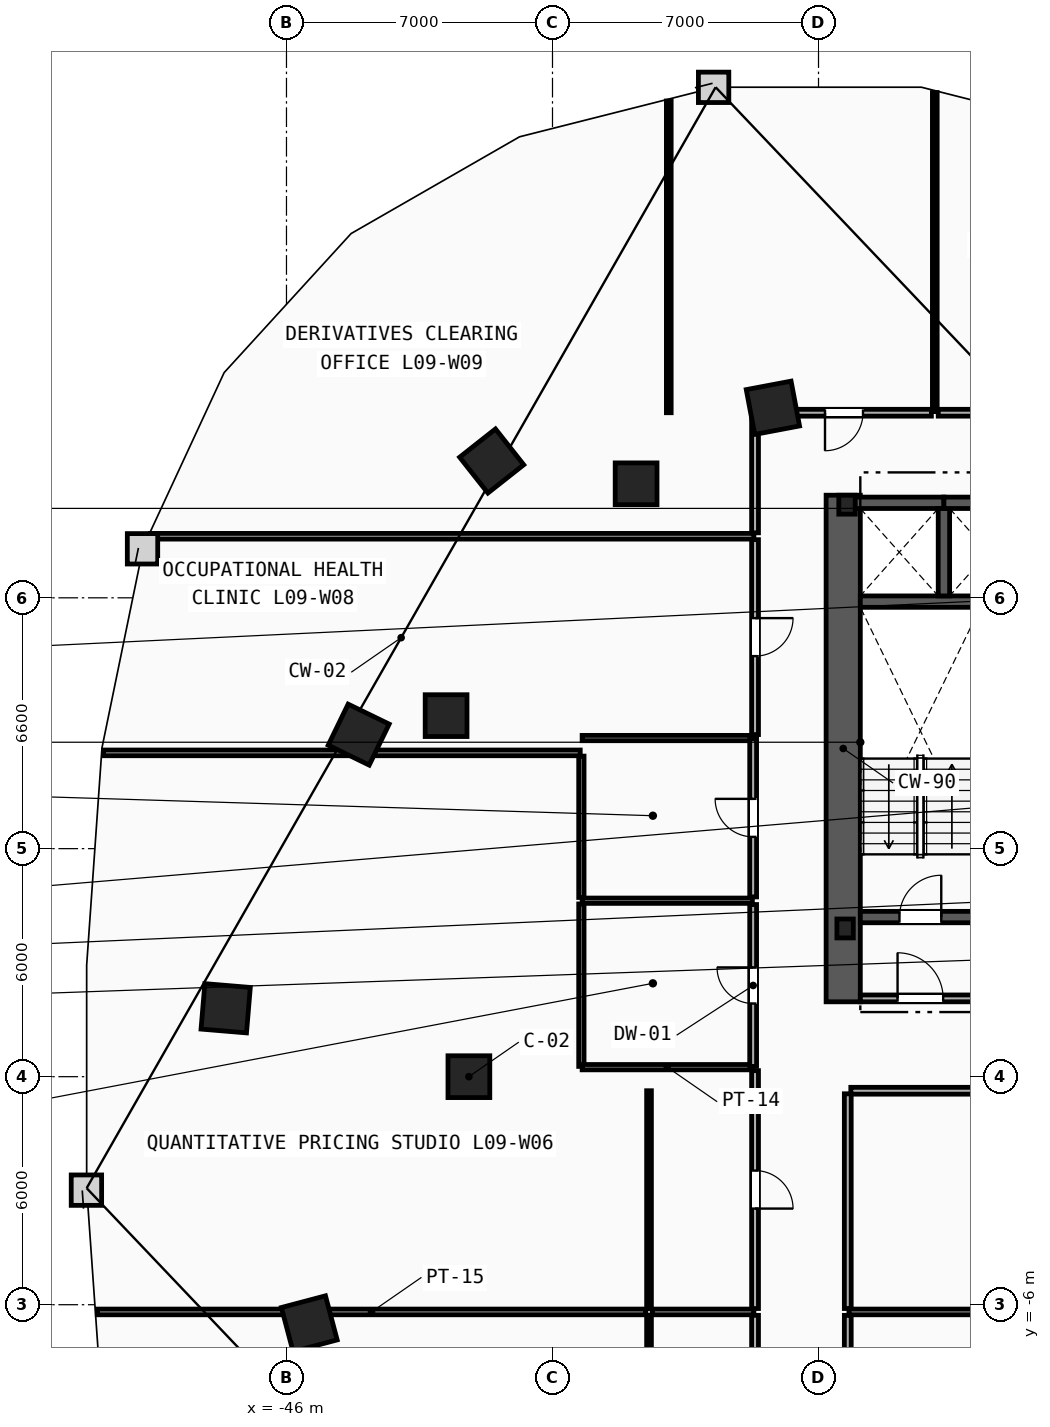
"""IFC4 building model, lengths in metres.
Left out: names, types, materials, properties, quantities, classifications, styles, units other than length and angle.
Written with IfcOpenShell. Run it as: python <this file> out.ifc"""

import sys

from ifc_helpers import new_model, si_unit, direction, frame, frame_2d, origin, origin_2d, place, context, subcontext, project, spatial, rectangle, i_section, extrude, element, fill, save


model = new_model("IFC4")
c1 = context("Model", 3, precision=1e-05, world=origin(), true_north=direction((0.0, 1.0)))
c2 = subcontext(c1, "Body", "Model", "MODEL_VIEW")
j1 = project(units=[si_unit("LENGTHUNIT", "METRE"), si_unit("PLANEANGLEUNIT", "RADIAN")], contexts=[c1])
p1 = place(None, origin())
s1 = spatial("IfcSite", under=j1, at=p1, CompositionType="ELEMENT")
p2 = place(p1, origin())
s2 = spatial("IfcBuilding", under=s1, at=p2, CompositionType="ELEMENT")
p3 = place(p2, frame((0.0, 0.0, 39.2)))
s3 = spatial("IfcBuildingStorey", under=s2, at=p3, CompositionType="ELEMENT", Elevation=39.2)
for number, where, z_axis, x_axis in (
    (1, (-31.3, 3.9, 0.0), (0.0, 0.0, 1.0), (1.0, 0.0, 0.0)),
    (2, (-31.25, 15.05, 0.0), (0.0, 0.0, 1.0), (1.0, 0.0, 0.0)),
):
    element("IfcColumn", number, at=place(p3, frame(where, z_axis=z_axis, x_axis=x_axis)), inside=s3, PredefinedType="COLUMN", context=c2, shape_type="SweptSolid", body=[
        extrude(i_section(OverallWidth=0.432, OverallDepth=0.498, WebThickness=0.056, FlangeThickness=0.089, FilletRadius=0.018, at=origin_2d()), origin(), (0.0, 0.0, 1.0), 3.8),
    ])
for number, where, z_axis, x_axis in (
    (3, (-41.2, 0.0, 0.0), (0.0, 0.0, 1.0), (1.0, 0.0, 0.0)),
    (4, (-41.8, 9.5, 0.0), (0.0, 0.0, 1.0), (1.0, 0.0, 0.0)),
    (5, (-36.8, 15.6, 0.0), (0.0, 0.0, 1.0), (1.0, 0.0, 0.0)),
):
    element("IfcColumn", number, at=place(p3, frame(where, z_axis=z_axis, x_axis=x_axis)), inside=s3, PredefinedType="COLUMN", context=c2, shape_type="SweptSolid", body=[
        extrude(rectangle(XDim=1.1, YDim=1.1, at=origin_2d()), origin(), (0.0, 0.0, 1.0), 3.8),
    ])
for number, where, z_axis, x_axis in (
    (6, (-33.2, 17.6, 0.0), (0.0, 0.0, 1.0), (-0.983, -0.186, 0.0)),
    (7, (-40.6, 16.2, 0.0), (0.0, 0.0, 1.0), (-0.785, -0.619, 0.0)),
    (8, (-44.1, 9.0, 0.0), (0.0, 0.0, 1.0), (-0.437, -0.899, 0.0)),
    (9, (-47.6, 1.8, 0.0), (0.0, 0.0, 1.0), (-0.084, -0.997, 0.0)),
    (10, (-45.4, -6.5, 0.0), (0.0, 0.0, 1.0), (0.256, -0.967, 0.0)),
):
    element("IfcColumn", number, at=place(p3, frame(where, z_axis=z_axis, x_axis=x_axis)), inside=s3, PredefinedType="COLUMN", context=c2, shape_type="SweptSolid", body=[
        extrude(rectangle(XDim=1.2, YDim=1.2, at=origin_2d()), origin(), (0.0, 0.0, 1.0), 3.8),
    ])
p4 = place(p3, frame((-31.35, 1.97, 0.0), z_axis=(0.0, 0.0, 1.0), x_axis=(0.0, 1.0, 0.0)))
e11 = element("IfcWall", 11, at=p4, inside=s3, PredefinedType="SHEAR", context=c2, shape_type="SweptSolid", body=[
    extrude(rectangle(XDim=13.33, YDim=0.9, at=frame_2d((6.665, 0.0))), origin(), (0.0, 0.0, 1.0), 3.5),
])
p5 = place(p3, frame((-30.9, 4.2, 0.0), z_axis=(0.0, 0.0, 1.0), x_axis=(1.0, 0.0, 0.0)))
e12 = element("IfcWall", 12, at=p5, inside=s3, PredefinedType="SHEAR", context=c2, shape_type="SweptSolid", body=[
    extrude(rectangle(XDim=3.16, YDim=0.3, at=frame_2d((1.58, 0.0))), origin(), (0.0, 0.0, 1.0), 3.5),
])
p6 = place(p5, frame((1.03, 0.0, 0.0)))
e13 = element("IfcOpeningElement", 13, at=p6, cuts=e12, PredefinedType="OPENING", context=c2, shape_type="SweptSolid", body=[
    extrude(rectangle(XDim=1.1, YDim=2.15, at=frame_2d((0.55, 1.075))), frame((0.0, 0.16, 0.0), z_axis=(0.0, -1.0, 0.0), x_axis=(1.0, 0.0, 0.0)), (0.0, 0.0, 1.0), 0.32),
])
p7 = place(p3, frame((-30.9, 12.5, 0.0), z_axis=(0.0, 0.0, 1.0), x_axis=(1.0, 0.0, 0.0)))
e14 = element("IfcWall", 14, at=p7, inside=s3, PredefinedType="SHEAR", context=c2, shape_type="SweptSolid", body=[
    extrude(rectangle(XDim=3.16, YDim=0.3, at=frame_2d((1.58, 0.0))), origin(), (0.0, 0.0, 1.0), 3.5),
])
p8 = place(p3, frame((-30.9, 2.06, 0.0), z_axis=(0.0, 0.0, 1.0), x_axis=(1.0, 0.0, 0.0)))
e15 = element("IfcWall", 15, at=p8, inside=s3, PredefinedType="PARTITIONING", context=c2, shape_type="SweptSolid", body=[
    extrude(rectangle(XDim=3.16, YDim=0.18, at=frame_2d((1.58, 0.0))), origin(), (0.0, 0.0, 1.0), 3.5),
])
p9 = place(p8, frame((0.98, 0.0, 0.0)))
e16 = element("IfcOpeningElement", 16, at=p9, cuts=e15, PredefinedType="OPENING", context=c2, shape_type="SweptSolid", body=[
    extrude(rectangle(XDim=1.2, YDim=2.15, at=frame_2d((0.6, 1.075))), frame((0.0, 0.1, 0.0), z_axis=(0.0, -1.0, 0.0), x_axis=(1.0, 0.0, 0.0)), (0.0, 0.0, 1.0), 0.2),
])
p10 = place(p3, frame((-31.2, 15.1, 0.0), z_axis=(0.0, 0.0, 1.0), x_axis=(1.0, 0.0, 0.0)))
e17 = element("IfcWall", 17, at=p10, inside=s3, PredefinedType="SHEAR", context=c2, shape_type="SweptSolid", body=[
    extrude(rectangle(XDim=2.5, YDim=0.3, at=frame_2d((1.25, 0.0))), origin(), (0.0, 0.0, 1.0), 3.5),
])
p11 = place(p3, frame((-28.7, 12.65, 0.0), z_axis=(0.0, 0.0, 1.0), x_axis=(0.0, 1.0, 0.0)))
e18 = element("IfcWall", 18, at=p11, inside=s3, PredefinedType="SHEAR", context=c2, shape_type="SweptSolid", body=[
    extrude(rectangle(XDim=2.3, YDim=0.3, at=frame_2d((1.15, 0.0))), origin(), (0.0, 0.0, 1.0), 3.5),
])
p12 = place(p3, frame((-28.7, 15.1, 0.0), z_axis=(0.0, 0.0, 1.0), x_axis=(1.0, 0.0, 0.0)))
e19 = element("IfcWall", 19, at=p12, inside=s3, PredefinedType="SHEAR", context=c2, shape_type="SweptSolid", body=[
    extrude(rectangle(XDim=2.5, YDim=0.3, at=frame_2d((1.25, 0.0))), origin(), (0.0, 0.0, 1.0), 3.5),
])
p13 = place(p3, frame((-38.24, 0.27, 0.0), z_axis=(0.0, 0.0, 1.0), x_axis=(0.0, 1.0, 0.0)))
e20 = element("IfcWall", 20, at=p13, inside=s3, PredefinedType="PARTITIONING", context=c2, shape_type="SweptSolid", body=[
    extrude(rectangle(XDim=4.275, YDim=0.14, at=frame_2d((2.137, 0.0))), origin(), (0.0, 0.0, 1.0), 3.5),
])
p14 = place(p3, frame((-38.24, 4.715, 0.0), z_axis=(0.0, 0.0, 1.0), x_axis=(0.0, 1.0, 0.0)))
e21 = element("IfcWall", 21, at=p14, inside=s3, PredefinedType="PARTITIONING", context=c2, shape_type="SweptSolid", body=[
    extrude(rectangle(XDim=3.72, YDim=0.14, at=frame_2d((1.86, 0.0))), origin(), (0.0, 0.0, 1.0), 3.5),
])
for number, where, z_axis, x_axis in (
    (22, (-38.22, 0.25, 0.0), (0.0, 0.0, 1.0), (1.0, 0.0, 0.0)),
    (23, (-38.22, 4.63, 0.0), (0.0, 0.0, 1.0), (1.0, 0.0, 0.0)),
    (24, (-38.22, 8.91, 0.0), (0.0, 0.0, 1.0), (1.0, 0.0, 0.0)),
):
    element("IfcWall", number, at=place(p3, frame(where, z_axis=z_axis, x_axis=x_axis)), inside=s3, PredefinedType="PARTITIONING", context=c2, shape_type="SweptSolid", body=[
        extrude(rectangle(XDim=4.48, YDim=0.14, at=frame_2d((2.24, 0.0))), origin(), (0.0, 0.0, 1.0), 3.5),
    ])
p15 = place(p3, frame((-33.72, 0.27, 0.0), z_axis=(0.0, 0.0, 1.0), x_axis=(0.0, 1.0, 0.0)))
e25 = element("IfcWall", 25, at=p15, inside=s3, PredefinedType="PARTITIONING", context=c2, shape_type="SweptSolid", body=[
    extrude(rectangle(XDim=4.26, YDim=0.18, at=frame_2d((2.13, 0.0))), origin(), (0.0, 0.0, 1.0), 3.5),
])
p16 = place(p15, frame((1.655, 0.0, 0.0)))
e26 = element("IfcOpeningElement", 26, at=p16, cuts=e25, PredefinedType="OPENING", context=c2, shape_type="SweptSolid", body=[
    extrude(rectangle(XDim=0.95, YDim=2.1, at=frame_2d((0.475, 1.05))), frame((0.0, 0.1, 0.0), z_axis=(0.0, -1.0, 0.0), x_axis=(1.0, 0.0, 0.0)), (0.0, 0.0, 1.0), 0.2),
])
p17 = place(p3, frame((-33.72, 4.73, 0.0), z_axis=(0.0, 0.0, 1.0), x_axis=(0.0, 1.0, 0.0)))
e27 = element("IfcWall", 27, at=p17, inside=s3, PredefinedType="PARTITIONING", context=c2, shape_type="SweptSolid", body=[
    extrude(rectangle(XDim=4.16, YDim=0.18, at=frame_2d((2.08, 0.0))), origin(), (0.0, 0.0, 1.0), 3.5),
])
p18 = place(p17, frame((1.58, 0.0, 0.0)))
e28 = element("IfcOpeningElement", 28, at=p18, cuts=e27, PredefinedType="OPENING", context=c2, shape_type="SweptSolid", body=[
    extrude(rectangle(XDim=1.0, YDim=2.15, at=frame_2d((0.5, 1.075))), frame((0.0, 0.1, 0.0), z_axis=(0.0, -1.0, 0.0), x_axis=(1.0, 0.0, 0.0)), (0.0, 0.0, 1.0), 0.2),
])
p19 = place(p3, frame((-36.46, -11.45, 0.0), z_axis=(0.0, 0.0, 1.0), x_axis=(0.0, 1.0, 0.0)))
e29 = element("IfcWall", 29, at=p19, inside=s3, PredefinedType="PARTITIONING", context=c2, shape_type="SweptSolid", body=[
    extrude(rectangle(XDim=5.175, YDim=0.125, at=frame_2d((2.587, 0.0))), origin(), (0.0, 0.0, 1.0), 3.5),
])
p20 = place(p3, frame((-36.46, -6.105, 0.0), z_axis=(0.0, 0.0, 1.0), x_axis=(0.0, 1.0, 0.0)))
e30 = element("IfcWall", 30, at=p20, inside=s3, PredefinedType="PARTITIONING", context=c2, shape_type="SweptSolid", body=[
    extrude(rectangle(XDim=5.735, YDim=0.125, at=frame_2d((2.867, 0.0))), origin(), (0.0, 0.0, 1.0), 3.5),
])
p21 = place(p3, frame((-50.979, -6.19, 0.0), z_axis=(0.0, 0.0, 1.0), x_axis=(1.0, 0.0, 0.0)))
e31 = element("IfcWall", 31, at=p21, inside=s3, PredefinedType="PARTITIONING", context=c2, shape_type="SweptSolid", body=[
    extrude(rectangle(XDim=14.434, YDim=0.15, at=frame_2d((7.217, 0.0))), origin(), (0.0, 0.0, 1.0), 3.5),
])
p22 = place(p3, frame((-36.375, -6.19, 0.0), z_axis=(0.0, 0.0, 1.0), x_axis=(1.0, 0.0, 0.0)))
e32 = element("IfcWall", 32, at=p22, inside=s3, PredefinedType="PARTITIONING", context=c2, shape_type="SweptSolid", body=[
    extrude(rectangle(XDim=2.675, YDim=0.15, at=frame_2d((1.337, 0.0))), origin(), (0.0, 0.0, 1.0), 3.5),
])
p23 = place(p3, frame((-31.2, -6.19, 0.0), z_axis=(0.0, 0.0, 1.0), x_axis=(1.0, 0.0, 0.0)))
e33 = element("IfcWall", 33, at=p23, inside=s3, PredefinedType="PARTITIONING", context=c2, shape_type="SweptSolid", body=[
    extrude(rectangle(XDim=18.178, YDim=0.15, at=frame_2d((9.089, 0.0))), origin(), (0.0, 0.0, 1.0), 3.5),
])
p24 = place(p3, frame((-50.814, 8.52, 0.0), z_axis=(0.0, 0.0, 1.0), x_axis=(1.0, 0.0, 0.0)))
e34 = element("IfcWall", 34, at=p24, inside=s3, PredefinedType="PARTITIONING", context=c2, shape_type="SweptSolid", body=[
    extrude(rectangle(XDim=12.544, YDim=0.15, at=frame_2d((6.272, 0.0))), origin(), (0.0, 0.0, 1.0), 3.5),
])
p25 = place(p3, frame((-49.585, 14.22, 0.0), z_axis=(0.0, 0.0, 1.0), x_axis=(1.0, 0.0, 0.0)))
e35 = element("IfcWall", 35, at=p25, inside=s3, PredefinedType="PARTITIONING", context=c2, shape_type="SweptSolid", body=[
    extrude(rectangle(XDim=15.885, YDim=0.15, at=frame_2d((7.942, 0.0))), origin(), (0.0, 0.0, 1.0), 3.5),
])
p26 = place(p3, frame((-35.94, 17.47, 0.0), z_axis=(0.0, 0.0, 1.0), x_axis=(0.0, 1.0, 0.0)))
e36 = element("IfcWall", 36, at=p26, inside=s3, PredefinedType="PARTITIONING", context=c2, shape_type="SweptSolid", body=[
    extrude(rectangle(XDim=8.202, YDim=0.125, at=frame_2d((4.101, 0.0))), origin(), (0.0, 0.0, 1.0), 3.5),
])
p27 = place(p3, frame((-28.94, 17.5, 0.0), z_axis=(0.0, 0.0, 1.0), x_axis=(0.0, 1.0, 0.0)))
e37 = element("IfcWall", 37, at=p27, inside=s3, PredefinedType="PARTITIONING", context=c2, shape_type="SweptSolid", body=[
    extrude(rectangle(XDim=8.395, YDim=0.125, at=frame_2d((4.197, 0.0))), origin(), (0.0, 0.0, 1.0), 3.5),
])
p28 = place(p3, frame((-31.23, -11.4, 0.0), z_axis=(0.0, 0.0, 1.0), x_axis=(0.0, 1.0, 0.0)))
e38 = element("IfcWall", 38, at=p28, inside=s3, PredefinedType="PARTITIONING", context=c2, shape_type="SweptSolid", body=[
    extrude(rectangle(XDim=5.12, YDim=0.18, at=frame_2d((2.56, 0.0))), origin(), (0.0, 0.0, 1.0), 3.5),
])
p29 = place(p3, frame((-33.67, -6.28, 0.0), z_axis=(0.0, 0.0, 1.0), x_axis=(0.0, -1.0, 0.0)))
e39 = element("IfcWall", 39, at=p29, inside=s3, PredefinedType="PARTITIONING", context=c2, shape_type="SweptSolid", body=[
    extrude(rectangle(XDim=5.12, YDim=0.18, at=frame_2d((2.56, 0.0))), origin(), (0.0, 0.0, 1.0), 3.5),
])
p30 = place(p29, frame((2.06, 0.0, 0.0)))
e40 = element("IfcOpeningElement", 40, at=p30, cuts=e39, PredefinedType="OPENING", context=c2, shape_type="SweptSolid", body=[
    extrude(rectangle(XDim=1.0, YDim=2.15, at=frame_2d((0.5, 1.075))), frame((0.0, 0.1, 0.0), z_axis=(0.0, -1.0, 0.0), x_axis=(1.0, 0.0, 0.0)), (0.0, 0.0, 1.0), 0.2),
])
p31 = place(p3, frame((-33.67, 0.159, 0.0), z_axis=(0.0, 0.0, 1.0), x_axis=(0.0, -1.0, 0.0)))
e41 = element("IfcWall", 41, at=p31, inside=s3, PredefinedType="PARTITIONING", context=c2, shape_type="SweptSolid", body=[
    extrude(rectangle(XDim=6.259, YDim=0.18, at=frame_2d((3.129, 0.0))), origin(), (0.0, 0.0, 1.0), 3.5),
])
p32 = place(p31, frame((2.629, 0.0, 0.0)))
e42 = element("IfcOpeningElement", 42, at=p32, cuts=e41, PredefinedType="OPENING", context=c2, shape_type="SweptSolid", body=[
    extrude(rectangle(XDim=1.0, YDim=2.15, at=frame_2d((0.5, 1.075))), frame((0.0, 0.1, 0.0), z_axis=(0.0, -1.0, 0.0), x_axis=(1.0, 0.0, 0.0)), (0.0, 0.0, 1.0), 0.2),
])
p33 = place(p3, frame((-31.15, -0.37, 0.0), z_axis=(0.0, 0.0, 1.0), x_axis=(1.0, 0.0, 0.0)))
e43 = element("IfcWall", 43, at=p33, inside=s3, PredefinedType="PARTITIONING", context=c2, shape_type="SweptSolid", body=[
    extrude(rectangle(XDim=14.328, YDim=0.18, at=frame_2d((7.164, 0.0))), origin(), (0.0, 0.0, 1.0), 3.5),
])
p34 = place(p33, frame((6.664, 0.0, 0.0)))
e44 = element("IfcOpeningElement", 44, at=p34, cuts=e43, PredefinedType="OPENING", context=c2, shape_type="SweptSolid", body=[
    extrude(rectangle(XDim=1.0, YDim=2.15, at=frame_2d((0.5, 1.075))), frame((0.0, 0.1, 0.0), z_axis=(0.0, -1.0, 0.0), x_axis=(1.0, 0.0, 0.0)), (0.0, 0.0, 1.0), 0.2),
])
p35 = place(p3, frame((-31.23, -6.1, 0.0), z_axis=(0.0, 0.0, 1.0), x_axis=(0.0, 1.0, 0.0)))
e45 = element("IfcWall", 45, at=p35, inside=s3, PredefinedType="PARTITIONING", context=c2, shape_type="SweptSolid", body=[
    extrude(rectangle(XDim=5.65, YDim=0.18, at=frame_2d((2.825, 0.0))), origin(), (0.0, 0.0, 1.0), 3.5),
])
p36 = place(p3, frame((-33.67, 14.13, 0.0), z_axis=(0.0, 0.0, 1.0), x_axis=(0.0, -1.0, 0.0)))
e46 = element("IfcWall", 46, at=p36, inside=s3, PredefinedType="PARTITIONING", context=c2, shape_type="SweptSolid", body=[
    extrude(rectangle(XDim=5.128, YDim=0.18, at=frame_2d((2.564, 0.0))), origin(), (0.0, 0.0, 1.0), 3.5),
])
p37 = place(p36, frame((2.064, 0.0, 0.0)))
e47 = element("IfcOpeningElement", 47, at=p37, cuts=e46, PredefinedType="OPENING", context=c2, shape_type="SweptSolid", body=[
    extrude(rectangle(XDim=1.0, YDim=2.15, at=frame_2d((0.5, 1.075))), frame((0.0, 0.1, 0.0), z_axis=(0.0, -1.0, 0.0), x_axis=(1.0, 0.0, 0.0)), (0.0, 0.0, 1.0), 0.2),
])
p38 = place(p3, frame((-29.03, 17.47, 0.0), z_axis=(0.0, 0.0, 1.0), x_axis=(-1.0, 0.0, 0.0)))
e48 = element("IfcWall", 48, at=p38, inside=s3, PredefinedType="PARTITIONING", context=c2, shape_type="SweptSolid", body=[
    extrude(rectangle(XDim=4.598, YDim=0.18, at=frame_2d((2.299, 0.0))), origin(), (0.0, 0.0, 1.0), 3.5),
])
p39 = place(p38, frame((1.799, 0.0, 0.0)))
e49 = element("IfcOpeningElement", 49, at=p39, cuts=e48, PredefinedType="OPENING", context=c2, shape_type="SweptSolid", body=[
    extrude(rectangle(XDim=1.0, YDim=2.15, at=frame_2d((0.5, 1.075))), frame((0.0, 0.1, 0.0), z_axis=(0.0, -1.0, 0.0), x_axis=(1.0, 0.0, 0.0)), (0.0, 0.0, 1.0), 0.2),
])
p40 = place(p3, frame((-33.67, 17.428, 0.0), z_axis=(0.0, 0.0, 1.0), x_axis=(0.0, -1.0, 0.0)))
e50 = element("IfcWall", 50, at=p40, inside=s3, PredefinedType="PARTITIONING", context=c2, shape_type="SweptSolid", body=[
    extrude(rectangle(XDim=3.118, YDim=0.18, at=frame_2d((1.559, 0.0))), origin(), (0.0, 0.0, 1.0), 3.5),
])
p41 = place(p3, frame((-23.03, 17.47, 0.0), z_axis=(0.0, 0.0, 1.0), x_axis=(-1.0, 0.0, 0.0)))
e51 = element("IfcWall", 51, at=p41, inside=s3, PredefinedType="PARTITIONING", context=c2, shape_type="SweptSolid", body=[
    extrude(rectangle(XDim=5.82, YDim=0.18, at=frame_2d((2.91, 0.0))), origin(), (0.0, 0.0, 1.0), 3.5),
])
p42 = place(p41, frame((1.036, 0.0, 0.0)))
e52 = element("IfcOpeningElement", 52, at=p42, cuts=e51, PredefinedType="OPENING", context=c2, shape_type="SweptSolid", body=[
    extrude(rectangle(XDim=1.0, YDim=2.15, at=frame_2d((0.5, 1.075))), frame((0.0, 0.1, 0.0), z_axis=(0.0, -1.0, 0.0), x_axis=(1.0, 0.0, 0.0)), (0.0, 0.0, 1.0), 0.2),
])
p43 = place(p6, origin())
e53 = element("IfcDoor", 53, at=p43, inside=s3, OperationType="SINGLE_SWING_RIGHT", PredefinedType="DOOR", context=c2, shape_type="SweptSolid", body=[
    extrude(rectangle(XDim=1.1, YDim=2.15, at=frame_2d((0.55, 1.075))), frame((0.0, 0.025, 0.0), z_axis=(0.0, -1.0, 0.0), x_axis=(1.0, 0.0, 0.0)), (0.0, 0.0, 1.0), 0.05),
])
fill(e13, e53)
p44 = place(p9, origin())
e54 = element("IfcDoor", 54, at=p44, inside=s3, OperationType="SINGLE_SWING_LEFT", PredefinedType="DOOR", context=c2, shape_type="SweptSolid", body=[
    extrude(rectangle(XDim=1.2, YDim=2.15, at=frame_2d((0.6, 1.075))), frame((0.0, 0.025, 0.0), z_axis=(0.0, -1.0, 0.0), x_axis=(1.0, 0.0, 0.0)), (0.0, 0.0, 1.0), 0.05),
])
fill(e16, e54)
p45 = place(p32, origin())
e55 = element("IfcDoor", 55, at=p45, inside=s3, OperationType="SINGLE_SWING_RIGHT", PredefinedType="DOOR", context=c2, shape_type="SweptSolid", body=[
    extrude(rectangle(XDim=1.0, YDim=2.15, at=frame_2d((0.5, 1.075))), frame((0.0, 0.025, 0.0), z_axis=(0.0, -1.0, 0.0), x_axis=(1.0, 0.0, 0.0)), (0.0, 0.0, 1.0), 0.05),
])
fill(e42, e55)
p46 = place(p37, origin())
e56 = element("IfcDoor", 56, at=p46, inside=s3, OperationType="SINGLE_SWING_LEFT", PredefinedType="DOOR", context=c2, shape_type="SweptSolid", body=[
    extrude(rectangle(XDim=1.0, YDim=2.15, at=frame_2d((0.5, 1.075))), frame((0.0, 0.025, 0.0), z_axis=(0.0, -1.0, 0.0), x_axis=(1.0, 0.0, 0.0)), (0.0, 0.0, 1.0), 0.05),
])
fill(e47, e56)
p47 = place(p39, origin())
e57 = element("IfcDoor", 57, at=p47, inside=s3, OperationType="SINGLE_SWING_RIGHT", PredefinedType="DOOR", context=c2, shape_type="SweptSolid", body=[
    extrude(rectangle(XDim=1.0, YDim=2.15, at=frame_2d((0.5, 1.075))), frame((0.0, 0.025, 0.0), z_axis=(0.0, -1.0, 0.0), x_axis=(1.0, 0.0, 0.0)), (0.0, 0.0, 1.0), 0.05),
])
fill(e49, e57)
p48 = place(p16, origin())
e58 = element("IfcDoor", 58, at=p48, inside=s3, OperationType="SINGLE_SWING_RIGHT", PredefinedType="DOOR", context=c2, shape_type="SweptSolid", body=[
    extrude(rectangle(XDim=0.95, YDim=2.1, at=frame_2d((0.475, 1.05))), frame((0.0, 0.025, 0.0), z_axis=(0.0, -1.0, 0.0), x_axis=(1.0, 0.0, 0.0)), (0.0, 0.0, 1.0), 0.05),
])
fill(e26, e58)
p49 = place(p18, origin())
e59 = element("IfcDoor", 59, at=p49, inside=s3, OperationType="SINGLE_SWING_RIGHT", PredefinedType="DOOR", context=c2, shape_type="SweptSolid", body=[
    extrude(rectangle(XDim=1.0, YDim=2.15, at=frame_2d((0.5, 1.075))), frame((0.0, 0.025, 0.0), z_axis=(0.0, -1.0, 0.0), x_axis=(1.0, 0.0, 0.0)), (0.0, 0.0, 1.0), 0.05),
])
fill(e28, e59)
save(model, sys.argv[1])
